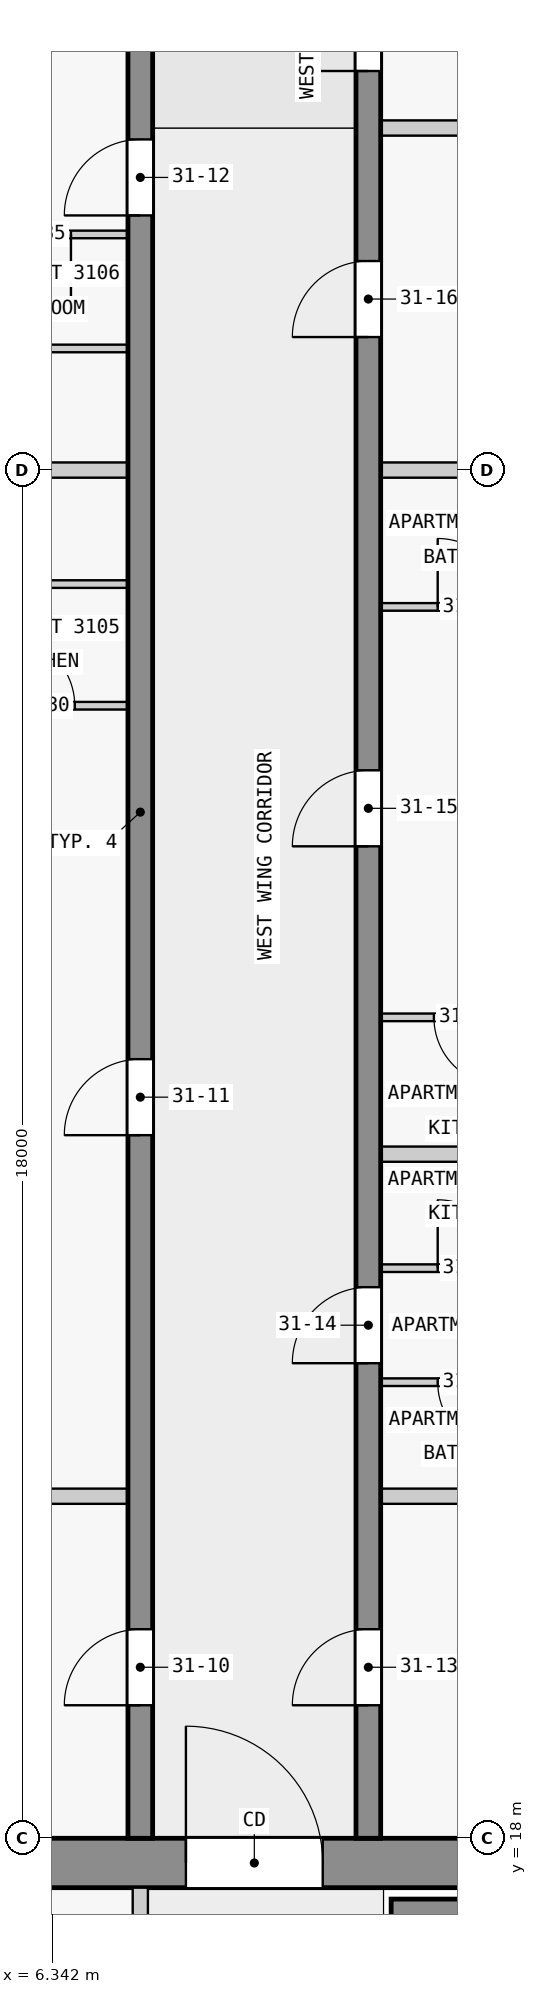
"""IFC4 building model, lengths in metres.
Left out: names, types, materials, properties, quantities, classifications, styles, units other than length and angle.
Written with IfcOpenShell. Run it as: python <this file> out.ifc"""

import sys

from ifc_helpers import new_model, si_unit, direction, frame, frame_2d, origin, place, context, subcontext, project, spatial, rectangle, extrude, element, fill, save


model = new_model("IFC4")
c1 = context("Model", 3, precision=1e-05, world=origin(), true_north=direction((0.0, 1.0)))
c2 = subcontext(c1, "Body", "Model", "MODEL_VIEW")
j1 = project(units=[si_unit("LENGTHUNIT", "METRE"), si_unit("PLANEANGLEUNIT", "RADIAN")], contexts=[c1])
p1 = place(None, origin())
s1 = spatial("IfcSite", under=j1, at=p1, CompositionType="ELEMENT")
p2 = place(p1, origin())
s2 = spatial("IfcBuilding", under=s1, at=p2, CompositionType="ELEMENT")
p3 = place(p2, frame((0.0, 0.0, 120.3)))
s3 = spatial("IfcBuildingStorey", under=s2, at=p3, CompositionType="ELEMENT", Elevation=120.3)
p4 = place(p3, frame((1.65, 17.675, 0.0), z_axis=(0.0, 0.0, 1.0), x_axis=(1.0, 0.0, 0.0)))
e1 = element("IfcWall", 1, at=p4, inside=s3, PredefinedType="SHEAR", context=c2, shape_type="SweptSolid", body=[
    extrude(rectangle(XDim=20.85, YDim=0.65, at=frame_2d((10.425, 0.0))), origin(), (0.0, 0.0, 1.0), 3.2),
])
p5 = place(p4, frame((6.45, 0.0, 0.0)))
e2 = element("IfcOpeningElement", 2, at=p5, cuts=e1, PredefinedType="OPENING", context=c2, shape_type="SweptSolid", body=[
    extrude(rectangle(XDim=1.8, YDim=2.1, at=frame_2d((0.9, 1.05))), frame((0.0, 0.335, 0.0), z_axis=(0.0, -1.0, 0.0), x_axis=(1.0, 0.0, 0.0)), (0.0, 0.0, 1.0), 0.67),
])
p6 = place(p3, frame((10.8, 17.05, 0.0), z_axis=(0.0, 0.0, 1.0), x_axis=(1.0, 0.0, 0.0)))
e3 = element("IfcWall", 3, at=p6, inside=s3, PredefinedType="SHEAR", context=c2, shape_type="SweptSolid", body=[
    extrude(rectangle(XDim=7.8, YDim=0.3, at=frame_2d((3.9, 0.0))), origin(), (0.0, 0.0, 1.0), 3.2),
])
p7 = place(p3, frame((7.5, 18.0, 0.0), z_axis=(0.0, 0.0, 1.0), x_axis=(0.0, 1.0, 0.0)))
e4 = element("IfcWall", 4, at=p7, inside=s3, PredefinedType="SHEAR", context=c2, shape_type="SweptSolid", body=[
    extrude(rectangle(XDim=27.0, YDim=0.325, at=frame_2d((13.5, 0.0))), origin(), (0.0, 0.0, 1.0), 3.2),
])
p8 = place(p7, frame((1.75, 0.0, 0.0)))
e5 = element("IfcOpeningElement", 5, at=p8, cuts=e4, PredefinedType="OPENING", context=c2, shape_type="SweptSolid", body=[
    extrude(rectangle(XDim=1.0, YDim=2.1, at=frame_2d((0.5, 1.05))), frame((0.0, 0.172, 0.0), z_axis=(0.0, -1.0, 0.0), x_axis=(1.0, 0.0, 0.0)), (0.0, 0.0, 1.0), 0.345),
])
p9 = place(p7, frame((9.25, 0.0, 0.0)))
e6 = element("IfcOpeningElement", 6, at=p9, cuts=e4, PredefinedType="OPENING", context=c2, shape_type="SweptSolid", body=[
    extrude(rectangle(XDim=1.0, YDim=2.1, at=frame_2d((0.5, 1.05))), frame((0.0, 0.172, 0.0), z_axis=(0.0, -1.0, 0.0), x_axis=(1.0, 0.0, 0.0)), (0.0, 0.0, 1.0), 0.345),
])
p10 = place(p7, frame((21.35, 0.0, 0.0)))
e7 = element("IfcOpeningElement", 7, at=p10, cuts=e4, PredefinedType="OPENING", context=c2, shape_type="SweptSolid", body=[
    extrude(rectangle(XDim=1.0, YDim=2.1, at=frame_2d((0.5, 1.05))), frame((0.0, 0.172, 0.0), z_axis=(0.0, -1.0, 0.0), x_axis=(1.0, 0.0, 0.0)), (0.0, 0.0, 1.0), 0.345),
])
p11 = place(p3, frame((10.5, 18.0, 0.0), z_axis=(0.0, 0.0, 1.0), x_axis=(0.0, 1.0, 0.0)))
e8 = element("IfcWall", 8, at=p11, inside=s3, PredefinedType="SHEAR", context=c2, shape_type="SweptSolid", body=[
    extrude(rectangle(XDim=27.0, YDim=0.325, at=frame_2d((13.5, 0.0))), origin(), (0.0, 0.0, 1.0), 3.2),
])
p12 = place(p11, frame((1.75, 0.0, 0.0)))
e9 = element("IfcOpeningElement", 9, at=p12, cuts=e8, PredefinedType="OPENING", context=c2, shape_type="SweptSolid", body=[
    extrude(rectangle(XDim=1.0, YDim=2.1, at=frame_2d((0.5, 1.05))), frame((0.0, 0.172, 0.0), z_axis=(0.0, -1.0, 0.0), x_axis=(1.0, 0.0, 0.0)), (0.0, 0.0, 1.0), 0.345),
])
p13 = place(p11, frame((6.25, 0.0, 0.0)))
e10 = element("IfcOpeningElement", 10, at=p13, cuts=e8, PredefinedType="OPENING", context=c2, shape_type="SweptSolid", body=[
    extrude(rectangle(XDim=1.0, YDim=2.1, at=frame_2d((0.5, 1.05))), frame((0.0, 0.172, 0.0), z_axis=(0.0, -1.0, 0.0), x_axis=(1.0, 0.0, 0.0)), (0.0, 0.0, 1.0), 0.345),
])
p14 = place(p11, frame((13.05, 0.0, 0.0)))
e11 = element("IfcOpeningElement", 11, at=p14, cuts=e8, PredefinedType="OPENING", context=c2, shape_type="SweptSolid", body=[
    extrude(rectangle(XDim=1.0, YDim=2.1, at=frame_2d((0.5, 1.05))), frame((0.0, 0.172, 0.0), z_axis=(0.0, -1.0, 0.0), x_axis=(1.0, 0.0, 0.0)), (0.0, 0.0, 1.0), 0.345),
])
p15 = place(p11, frame((19.75, 0.0, 0.0)))
e12 = element("IfcOpeningElement", 12, at=p15, cuts=e8, PredefinedType="OPENING", context=c2, shape_type="SweptSolid", body=[
    extrude(rectangle(XDim=1.0, YDim=2.1, at=frame_2d((0.5, 1.05))), frame((0.0, 0.172, 0.0), z_axis=(0.0, -1.0, 0.0), x_axis=(1.0, 0.0, 0.0)), (0.0, 0.0, 1.0), 0.345),
])
p16 = place(p11, frame((23.25, 0.0, 0.0)))
e13 = element("IfcOpeningElement", 13, at=p16, cuts=e8, PredefinedType="OPENING", context=c2, shape_type="SweptSolid", body=[
    extrude(rectangle(XDim=0.9, YDim=2.1, at=frame_2d((0.45, 1.05))), frame((0.0, 0.172, 0.0), z_axis=(0.0, -1.0, 0.0), x_axis=(1.0, 0.0, 0.0)), (0.0, 0.0, 1.0), 0.345),
])
p17 = place(p11, frame((25.45, 0.0, 0.0)))
e14 = element("IfcOpeningElement", 14, at=p17, cuts=e8, PredefinedType="OPENING", context=c2, shape_type="SweptSolid", body=[
    extrude(rectangle(XDim=1.0, YDim=2.1, at=frame_2d((0.5, 1.05))), frame((0.0, 0.172, 0.0), z_axis=(0.0, -1.0, 0.0), x_axis=(1.0, 0.0, 0.0)), (0.0, 0.0, 1.0), 0.345),
])
p18 = place(p3, frame((7.5, 10.1, 0.0), z_axis=(0.0, 0.0, 1.0), x_axis=(0.0, 1.0, 0.0)))
e15 = element("IfcWall", 15, at=p18, inside=s3, PredefinedType="PARTITIONING", context=c2, shape_type="SweptSolid", body=[
    extrude(rectangle(XDim=7.25, YDim=0.2, at=frame_2d((3.625, 0.0))), origin(), (0.0, 0.0, 1.0), 3.2),
])
p19 = place(p18, frame((1.5, 0.0, 0.0)))
e16 = element("IfcOpeningElement", 16, at=p19, cuts=e15, PredefinedType="OPENING", context=c2, shape_type="SweptSolid", body=[
    extrude(rectangle(XDim=0.9, YDim=2.1, at=frame_2d((0.45, 1.05))), frame((0.0, 0.11, 0.0), z_axis=(0.0, -1.0, 0.0), x_axis=(1.0, 0.0, 0.0)), (0.0, 0.0, 1.0), 0.22),
])
p20 = place(p18, frame((5.125, 0.0, 0.0)))
e17 = element("IfcOpeningElement", 17, at=p20, cuts=e15, PredefinedType="OPENING", context=c2, shape_type="SweptSolid", body=[
    extrude(rectangle(XDim=0.9, YDim=2.1, at=frame_2d((0.45, 1.05))), frame((0.0, 0.11, 0.0), z_axis=(0.0, -1.0, 0.0), x_axis=(1.0, 0.0, 0.0)), (0.0, 0.0, 1.0), 0.22),
])
for number, where, z_axis, x_axis in (
    (18, (7.337, 22.5, 0.0), (0.0, 0.0, 1.0), (-1.0, 0.0, 0.0)),
    (19, (17.85, 22.5, 0.0), (0.0, 0.0, 1.0), (-1.0, 0.0, 0.0)),
):
    element("IfcWall", number, at=place(p3, frame(where, z_axis=z_axis, x_axis=x_axis)), inside=s3, PredefinedType="PARTITIONING", context=c2, shape_type="SweptSolid", body=[
        extrude(rectangle(XDim=7.188, YDim=0.2, at=frame_2d((3.594, 0.0))), origin(), (0.0, 0.0, 1.0), 3.2),
    ])
p21 = place(p3, frame((13.062, 24.0, 0.0), z_axis=(0.0, 0.0, 1.0), x_axis=(-1.0, 0.0, 0.0)))
e20 = element("IfcWall", 20, at=p21, inside=s3, PredefinedType="PARTITIONING", context=c2, shape_type="SweptSolid", body=[
    extrude(rectangle(XDim=2.4, YDim=0.1, at=frame_2d((1.2, 0.0))), origin(), (0.0, 0.0, 1.0), 3.2),
])
p22 = place(p21, frame((0.75, 0.0, 0.0)))
e21 = element("IfcOpeningElement", 21, at=p22, cuts=e20, PredefinedType="OPENING", context=c2, shape_type="SweptSolid", body=[
    extrude(rectangle(XDim=0.9, YDim=2.1, at=frame_2d((0.45, 1.05))), frame((0.0, 0.06, 0.0), z_axis=(0.0, -1.0, 0.0), x_axis=(1.0, 0.0, 0.0)), (0.0, 0.0, 1.0), 0.12),
])
p23 = place(p3, frame((10.663, 25.5, 0.0), z_axis=(0.0, 0.0, 1.0), x_axis=(1.0, 0.0, 0.0)))
e22 = element("IfcWall", 22, at=p23, inside=s3, PredefinedType="PARTITIONING", context=c2, shape_type="SweptSolid", body=[
    extrude(rectangle(XDim=2.35, YDim=0.1, at=frame_2d((1.175, 0.0))), origin(), (0.0, 0.0, 1.0), 3.2),
])
p24 = place(p23, frame((0.75, 0.0, 0.0)))
e23 = element("IfcOpeningElement", 23, at=p24, cuts=e22, PredefinedType="OPENING", context=c2, shape_type="SweptSolid", body=[
    extrude(rectangle(XDim=0.9, YDim=2.1, at=frame_2d((0.45, 1.05))), frame((0.0, 0.06, 0.0), z_axis=(0.0, -1.0, 0.0), x_axis=(1.0, 0.0, 0.0)), (0.0, 0.0, 1.0), 0.12),
])
p25 = place(p3, frame((12.962, 27.0, 0.0), z_axis=(0.0, 0.0, 1.0), x_axis=(-1.0, 0.0, 0.0)))
e24 = element("IfcWall", 24, at=p25, inside=s3, PredefinedType="PARTITIONING", context=c2, shape_type="SweptSolid", body=[
    extrude(rectangle(XDim=2.3, YDim=0.2, at=frame_2d((1.15, 0.0))), origin(), (0.0, 0.0, 1.0), 3.2),
])
p26 = place(p3, frame((13.012, 28.8, 0.0), z_axis=(0.0, 0.0, 1.0), x_axis=(-1.0, 0.0, 0.0)))
e25 = element("IfcWall", 25, at=p26, inside=s3, PredefinedType="PARTITIONING", context=c2, shape_type="SweptSolid", body=[
    extrude(rectangle(XDim=2.35, YDim=0.1, at=frame_2d((1.175, 0.0))), origin(), (0.0, 0.0, 1.0), 3.2),
])
p27 = place(p26, frame((0.75, 0.0, 0.0)))
e26 = element("IfcOpeningElement", 26, at=p27, cuts=e25, PredefinedType="OPENING", context=c2, shape_type="SweptSolid", body=[
    extrude(rectangle(XDim=0.9, YDim=2.1, at=frame_2d((0.45, 1.05))), frame((0.0, 0.06, 0.0), z_axis=(0.0, -1.0, 0.0), x_axis=(1.0, 0.0, 0.0)), (0.0, 0.0, 1.0), 0.12),
])
p28 = place(p3, frame((4.988, 32.9, 0.0), z_axis=(0.0, 0.0, 1.0), x_axis=(1.0, 0.0, 0.0)))
e27 = element("IfcWall", 27, at=p28, inside=s3, PredefinedType="PARTITIONING", context=c2, shape_type="SweptSolid", body=[
    extrude(rectangle(XDim=2.35, YDim=0.1, at=frame_2d((1.175, 0.0))), origin(), (0.0, 0.0, 1.0), 3.2),
])
p29 = place(p28, frame((0.75, 0.0, 0.0)))
e28 = element("IfcOpeningElement", 28, at=p29, cuts=e27, PredefinedType="OPENING", context=c2, shape_type="SweptSolid", body=[
    extrude(rectangle(XDim=0.9, YDim=2.1, at=frame_2d((0.45, 1.05))), frame((0.0, 0.06, 0.0), z_axis=(0.0, -1.0, 0.0), x_axis=(1.0, 0.0, 0.0)), (0.0, 0.0, 1.0), 0.12),
])
p30 = place(p3, frame((10.663, 34.2, 0.0), z_axis=(0.0, 0.0, 1.0), x_axis=(1.0, 0.0, 0.0)))
e29 = element("IfcWall", 29, at=p30, inside=s3, PredefinedType="PARTITIONING", context=c2, shape_type="SweptSolid", body=[
    extrude(rectangle(XDim=2.35, YDim=0.1, at=frame_2d((1.175, 0.0))), origin(), (0.0, 0.0, 1.0), 3.2),
])
p31 = place(p30, frame((0.75, 0.0, 0.0)))
e30 = element("IfcOpeningElement", 30, at=p31, cuts=e29, PredefinedType="OPENING", context=c2, shape_type="SweptSolid", body=[
    extrude(rectangle(XDim=0.9, YDim=2.1, at=frame_2d((0.45, 1.05))), frame((0.0, 0.06, 0.0), z_axis=(0.0, -1.0, 0.0), x_axis=(1.0, 0.0, 0.0)), (0.0, 0.0, 1.0), 0.12),
])
p32 = place(p3, frame((7.337, 34.5, 0.0), z_axis=(0.0, 0.0, 1.0), x_axis=(-1.0, 0.0, 0.0)))
e31 = element("IfcWall", 31, at=p32, inside=s3, PredefinedType="PARTITIONING", context=c2, shape_type="SweptSolid", body=[
    extrude(rectangle(XDim=2.35, YDim=0.1, at=frame_2d((1.175, 0.0))), origin(), (0.0, 0.0, 1.0), 3.2),
])
p33 = place(p3, frame((7.337, 36.0, 0.0), z_axis=(0.0, 0.0, 1.0), x_axis=(-1.0, 0.0, 0.0)))
e32 = element("IfcWall", 32, at=p33, inside=s3, PredefinedType="PARTITIONING", context=c2, shape_type="SweptSolid", body=[
    extrude(rectangle(XDim=2.3, YDim=0.2, at=frame_2d((1.15, 0.0))), origin(), (0.0, 0.0, 1.0), 3.2),
])
p34 = place(p3, frame((16.6, 36.0, 0.0), z_axis=(0.0, 0.0, 1.0), x_axis=(-1.0, 0.0, 0.0)))
e33 = element("IfcWall", 33, at=p34, inside=s3, PredefinedType="PARTITIONING", context=c2, shape_type="SweptSolid", body=[
    extrude(rectangle(XDim=5.938, YDim=0.2, at=frame_2d((2.969, 0.0))), origin(), (0.0, 0.0, 1.0), 3.2),
])
p35 = place(p3, frame((7.337, 37.6, 0.0), z_axis=(0.0, 0.0, 1.0), x_axis=(-1.0, 0.0, 0.0)))
e34 = element("IfcWall", 34, at=p35, inside=s3, PredefinedType="PARTITIONING", context=c2, shape_type="SweptSolid", body=[
    extrude(rectangle(XDim=2.35, YDim=0.1, at=frame_2d((1.175, 0.0))), origin(), (0.0, 0.0, 1.0), 3.2),
])
p36 = place(p3, frame((7.337, 39.1, 0.0), z_axis=(0.0, 0.0, 1.0), x_axis=(-1.0, 0.0, 0.0)))
e35 = element("IfcWall", 35, at=p36, inside=s3, PredefinedType="PARTITIONING", context=c2, shape_type="SweptSolid", body=[
    extrude(rectangle(XDim=2.35, YDim=0.1, at=frame_2d((1.175, 0.0))), origin(), (0.0, 0.0, 1.0), 3.2),
])
p37 = place(p36, frame((0.75, 0.0, 0.0)))
e36 = element("IfcOpeningElement", 36, at=p37, cuts=e35, PredefinedType="OPENING", context=c2, shape_type="SweptSolid", body=[
    extrude(rectangle(XDim=0.9, YDim=2.1, at=frame_2d((0.45, 1.05))), frame((0.0, 0.06, 0.0), z_axis=(0.0, -1.0, 0.0), x_axis=(1.0, 0.0, 0.0)), (0.0, 0.0, 1.0), 0.12),
])
p38 = place(p3, frame((18.08, 40.5, 0.0), z_axis=(0.0, 0.0, 1.0), x_axis=(-1.0, 0.0, 0.0)))
e37 = element("IfcWall", 37, at=p38, inside=s3, PredefinedType="PARTITIONING", context=c2, shape_type="SweptSolid", body=[
    extrude(rectangle(XDim=7.417, YDim=0.2, at=frame_2d((3.709, 0.0))), origin(), (0.0, 0.0, 1.0), 3.2),
])
p39 = place(p5, origin())
e38 = element("IfcDoor", 38, at=p39, inside=s3, OperationType="DOUBLE_DOOR_SINGLE_SWING", PredefinedType="DOOR", context=c2, shape_type="SweptSolid", body=[
    extrude(rectangle(XDim=1.8, YDim=2.1, at=frame_2d((0.9, 1.05))), frame((0.0, 0.025, 0.0), z_axis=(0.0, -1.0, 0.0), x_axis=(1.0, 0.0, 0.0)), (0.0, 0.0, 1.0), 0.05),
])
fill(e2, e38)
p40 = place(p8, origin())
e39 = element("IfcDoor", 39, at=p40, inside=s3, OperationType="SINGLE_SWING_LEFT", PredefinedType="DOOR", context=c2, shape_type="SweptSolid", body=[
    extrude(rectangle(XDim=1.0, YDim=2.1, at=frame_2d((0.5, 1.05))), frame((0.0, 0.025, 0.0), z_axis=(0.0, -1.0, 0.0), x_axis=(1.0, 0.0, 0.0)), (0.0, 0.0, 1.0), 0.05),
])
fill(e5, e39)
p41 = place(p9, origin())
e40 = element("IfcDoor", 40, at=p41, inside=s3, OperationType="SINGLE_SWING_LEFT", PredefinedType="DOOR", context=c2, shape_type="SweptSolid", body=[
    extrude(rectangle(XDim=1.0, YDim=2.1, at=frame_2d((0.5, 1.05))), frame((0.0, 0.025, 0.0), z_axis=(0.0, -1.0, 0.0), x_axis=(1.0, 0.0, 0.0)), (0.0, 0.0, 1.0), 0.05),
])
fill(e6, e40)
p42 = place(p10, origin())
e41 = element("IfcDoor", 41, at=p42, inside=s3, OperationType="SINGLE_SWING_RIGHT", PredefinedType="DOOR", context=c2, shape_type="SweptSolid", body=[
    extrude(rectangle(XDim=1.0, YDim=2.1, at=frame_2d((0.5, 1.05))), frame((0.0, 0.025, 0.0), z_axis=(0.0, -1.0, 0.0), x_axis=(1.0, 0.0, 0.0)), (0.0, 0.0, 1.0), 0.05),
])
fill(e7, e41)
p43 = place(p12, origin())
e42 = element("IfcDoor", 42, at=p43, inside=s3, OperationType="SINGLE_SWING_LEFT", PredefinedType="DOOR", context=c2, shape_type="SweptSolid", body=[
    extrude(rectangle(XDim=1.0, YDim=2.1, at=frame_2d((0.5, 1.05))), frame((0.0, 0.025, 0.0), z_axis=(0.0, -1.0, 0.0), x_axis=(1.0, 0.0, 0.0)), (0.0, 0.0, 1.0), 0.05),
])
fill(e9, e42)
p44 = place(p13, origin())
e43 = element("IfcDoor", 43, at=p44, inside=s3, OperationType="SINGLE_SWING_LEFT", PredefinedType="DOOR", context=c2, shape_type="SweptSolid", body=[
    extrude(rectangle(XDim=1.0, YDim=2.1, at=frame_2d((0.5, 1.05))), frame((0.0, 0.025, 0.0), z_axis=(0.0, -1.0, 0.0), x_axis=(1.0, 0.0, 0.0)), (0.0, 0.0, 1.0), 0.05),
])
fill(e10, e43)
p45 = place(p14, origin())
e44 = element("IfcDoor", 44, at=p45, inside=s3, OperationType="SINGLE_SWING_RIGHT", PredefinedType="DOOR", context=c2, shape_type="SweptSolid", body=[
    extrude(rectangle(XDim=1.0, YDim=2.1, at=frame_2d((0.5, 1.05))), frame((0.0, 0.025, 0.0), z_axis=(0.0, -1.0, 0.0), x_axis=(1.0, 0.0, 0.0)), (0.0, 0.0, 1.0), 0.05),
])
fill(e11, e44)
p46 = place(p15, origin())
e45 = element("IfcDoor", 45, at=p46, inside=s3, OperationType="SINGLE_SWING_RIGHT", PredefinedType="DOOR", context=c2, shape_type="SweptSolid", body=[
    extrude(rectangle(XDim=1.0, YDim=2.1, at=frame_2d((0.5, 1.05))), frame((0.0, 0.025, 0.0), z_axis=(0.0, -1.0, 0.0), x_axis=(1.0, 0.0, 0.0)), (0.0, 0.0, 1.0), 0.05),
])
fill(e12, e45)
p47 = place(p16, origin())
e46 = element("IfcDoor", 46, at=p47, inside=s3, OperationType="SINGLE_SWING_RIGHT", PredefinedType="DOOR", context=c2, shape_type="SweptSolid", body=[
    extrude(rectangle(XDim=0.9, YDim=2.1, at=frame_2d((0.45, 1.05))), frame((0.0, 0.025, 0.0), z_axis=(0.0, -1.0, 0.0), x_axis=(1.0, 0.0, 0.0)), (0.0, 0.0, 1.0), 0.05),
])
fill(e13, e46)
p48 = place(p29, origin())
e47 = element("IfcDoor", 47, at=p48, inside=s3, OperationType="SINGLE_SWING_RIGHT", PredefinedType="DOOR", context=c2, shape_type="SweptSolid", body=[
    extrude(rectangle(XDim=0.9, YDim=2.1, at=frame_2d((0.45, 1.05))), frame((0.0, 0.025, 0.0), z_axis=(0.0, -1.0, 0.0), x_axis=(1.0, 0.0, 0.0)), (0.0, 0.0, 1.0), 0.05),
])
fill(e28, e47)
p49 = place(p37, origin())
e48 = element("IfcDoor", 48, at=p49, inside=s3, OperationType="SINGLE_SWING_RIGHT", PredefinedType="DOOR", context=c2, shape_type="SweptSolid", body=[
    extrude(rectangle(XDim=0.9, YDim=2.1, at=frame_2d((0.45, 1.05))), frame((0.0, 0.025, 0.0), z_axis=(0.0, -1.0, 0.0), x_axis=(1.0, 0.0, 0.0)), (0.0, 0.0, 1.0), 0.05),
])
fill(e36, e48)
p50 = place(p22, origin())
e49 = element("IfcDoor", 49, at=p50, inside=s3, OperationType="SINGLE_SWING_LEFT", PredefinedType="DOOR", context=c2, shape_type="SweptSolid", body=[
    extrude(rectangle(XDim=0.9, YDim=2.1, at=frame_2d((0.45, 1.05))), frame((0.0, 0.025, 0.0), z_axis=(0.0, -1.0, 0.0), x_axis=(1.0, 0.0, 0.0)), (0.0, 0.0, 1.0), 0.05),
])
fill(e21, e49)
p51 = place(p24, origin())
e50 = element("IfcDoor", 50, at=p51, inside=s3, OperationType="SINGLE_SWING_RIGHT", PredefinedType="DOOR", context=c2, shape_type="SweptSolid", body=[
    extrude(rectangle(XDim=0.9, YDim=2.1, at=frame_2d((0.45, 1.05))), frame((0.0, 0.025, 0.0), z_axis=(0.0, -1.0, 0.0), x_axis=(1.0, 0.0, 0.0)), (0.0, 0.0, 1.0), 0.05),
])
fill(e23, e50)
p52 = place(p27, origin())
e51 = element("IfcDoor", 51, at=p52, inside=s3, OperationType="SINGLE_SWING_RIGHT", PredefinedType="DOOR", context=c2, shape_type="SweptSolid", body=[
    extrude(rectangle(XDim=0.9, YDim=2.1, at=frame_2d((0.45, 1.05))), frame((0.0, 0.025, 0.0), z_axis=(0.0, -1.0, 0.0), x_axis=(1.0, 0.0, 0.0)), (0.0, 0.0, 1.0), 0.05),
])
fill(e26, e51)
p53 = place(p31, origin())
e52 = element("IfcDoor", 52, at=p53, inside=s3, OperationType="SINGLE_SWING_RIGHT", PredefinedType="DOOR", context=c2, shape_type="SweptSolid", body=[
    extrude(rectangle(XDim=0.9, YDim=2.1, at=frame_2d((0.45, 1.05))), frame((0.0, 0.025, 0.0), z_axis=(0.0, -1.0, 0.0), x_axis=(1.0, 0.0, 0.0)), (0.0, 0.0, 1.0), 0.05),
])
fill(e30, e52)
save(model, sys.argv[1])
